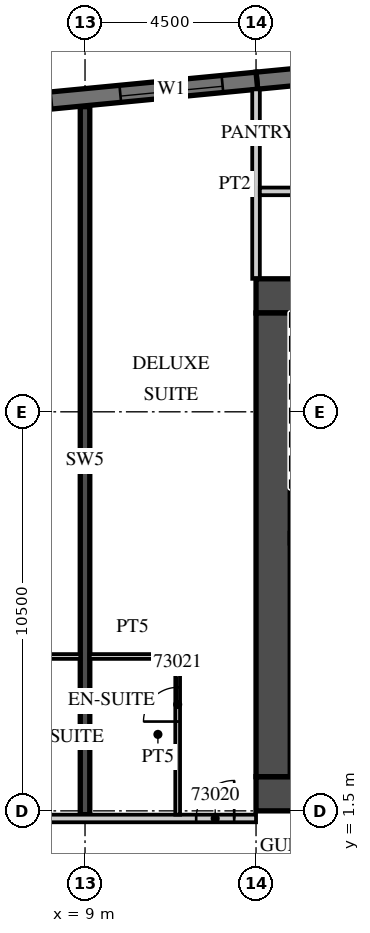
"""IFC4 building model, lengths in metres.
Left out: names, types, materials, properties, quantities, classifications, styles, units other than length and angle.
Written with IfcOpenShell. Run it as: python <this file> out.ifc"""

import sys

from ifc_helpers import new_model, si_unit, direction, frame, frame_2d, origin, place, context, subcontext, project, spatial, rectangle, extrude, element, fill, save


model = new_model("IFC4")
c1 = context("Model", 3, precision=1e-05, world=origin(), true_north=direction((0.0, 1.0)))
c2 = subcontext(c1, "Body", "Model", "MODEL_VIEW")
j1 = project(units=[si_unit("LENGTHUNIT", "METRE"), si_unit("PLANEANGLEUNIT", "RADIAN")], contexts=[c1])
p1 = place(None, origin())
s1 = spatial("IfcSite", under=j1, at=p1, CompositionType="ELEMENT")
p2 = place(p1, origin())
s2 = spatial("IfcBuilding", under=s1, at=p2, CompositionType="ELEMENT")
p3 = place(p2, frame((0.0, 0.0, 291.6)))
s3 = spatial("IfcBuildingStorey", under=s2, at=p3, CompositionType="ELEMENT", Elevation=291.6)
p4 = place(p3, frame((9.0, 1.4, 0.0), z_axis=(0.0, 0.0, 1.0), x_axis=(0.0, 1.0, 0.0)))
e1 = element("IfcWall", 1, at=p4, inside=s3, PredefinedType="SHEAR", context=c2, shape_type="SweptSolid", body=[
    extrude(rectangle(XDim=18.629, YDim=0.25, at=frame_2d((9.315, 0.0))), origin(), (0.0, 0.0, 1.0), 3.3),
])
p5 = place(p3, frame((30.946, 22.391, 0.0), z_axis=(0.0, 0.0, 1.0), x_axis=(-0.995396397117, -0.095843688398, 0.0)))
e2 = element("IfcWall", 2, at=p5, inside=s3, PredefinedType="SOLIDWALL", context=c2, shape_type="SweptSolid", body=[
    extrude(rectangle(XDim=17.505, YDim=0.45, at=frame_2d((8.752, 0.0))), origin(), (0.0, 0.0, 1.0), 3.02),
])
p6 = place(p3, frame((13.521, 20.713, 0.0), z_axis=(0.0, 0.0, 1.0), x_axis=(-0.995396277313, -0.095844932638, 0.0)))
e3 = element("IfcWall", 3, at=p6, inside=s3, PredefinedType="SOLIDWALL", context=c2, shape_type="SweptSolid", body=[
    extrude(rectangle(XDim=51.495, YDim=0.45, at=frame_2d((25.748, 0.0))), origin(), (0.0, 0.0, 1.0), 3.02),
])
p7 = place(p6, frame((0.91, 0.0, 0.45)))
e4 = element("IfcOpeningElement", 4, at=p7, cuts=e3, PredefinedType="OPENING", context=c2, shape_type="SweptSolid", body=[
    extrude(rectangle(XDim=2.7, YDim=2.25, at=frame_2d((1.35, 1.125))), frame((0.0, 0.235, 0.0), z_axis=(0.0, -1.0, 0.0), x_axis=(1.0, 0.0, 0.0)), (0.0, 0.0, 1.0), 0.47),
])
p8 = place(p6, frame((5.431, 0.0, 0.45)))
e5 = element("IfcOpeningElement", 5, at=p8, cuts=e3, PredefinedType="OPENING", context=c2, shape_type="SweptSolid", body=[
    extrude(rectangle(XDim=2.7, YDim=2.25, at=frame_2d((1.35, 1.125))), frame((0.0, 0.235, 0.0), z_axis=(0.0, -1.0, 0.0), x_axis=(1.0, 0.0, 0.0)), (0.0, 0.0, 1.0), 0.47),
])
p9 = place(p6, frame((9.952, 0.0, 0.45)))
e6 = element("IfcOpeningElement", 6, at=p9, cuts=e3, PredefinedType="OPENING", context=c2, shape_type="SweptSolid", body=[
    extrude(rectangle(XDim=2.7, YDim=2.25, at=frame_2d((1.35, 1.125))), frame((0.0, 0.235, 0.0), z_axis=(0.0, -1.0, 0.0), x_axis=(1.0, 0.0, 0.0)), (0.0, 0.0, 1.0), 0.47),
])
p10 = place(p6, frame((14.473, 0.0, 0.45)))
e7 = element("IfcOpeningElement", 7, at=p10, cuts=e3, PredefinedType="OPENING", context=c2, shape_type="SweptSolid", body=[
    extrude(rectangle(XDim=2.7, YDim=2.25, at=frame_2d((1.35, 1.125))), frame((0.0, 0.235, 0.0), z_axis=(0.0, -1.0, 0.0), x_axis=(1.0, 0.0, 0.0)), (0.0, 0.0, 1.0), 0.47),
])
p11 = place(p6, frame((18.994, 0.0, 0.45)))
e8 = element("IfcOpeningElement", 8, at=p11, cuts=e3, PredefinedType="OPENING", context=c2, shape_type="SweptSolid", body=[
    extrude(rectangle(XDim=2.7, YDim=2.25, at=frame_2d((1.35, 1.125))), frame((0.0, 0.235, 0.0), z_axis=(0.0, -1.0, 0.0), x_axis=(1.0, 0.0, 0.0)), (0.0, 0.0, 1.0), 0.47),
])
p12 = place(p6, frame((23.514, 0.0, 0.45)))
e9 = element("IfcOpeningElement", 9, at=p12, cuts=e3, PredefinedType="OPENING", context=c2, shape_type="SweptSolid", body=[
    extrude(rectangle(XDim=2.7, YDim=2.25, at=frame_2d((1.35, 1.125))), frame((0.0, 0.235, 0.0), z_axis=(0.0, -1.0, 0.0), x_axis=(1.0, 0.0, 0.0)), (0.0, 0.0, 1.0), 0.47),
])
p13 = place(p6, frame((28.035, 0.0, 0.45)))
e10 = element("IfcOpeningElement", 10, at=p13, cuts=e3, PredefinedType="OPENING", context=c2, shape_type="SweptSolid", body=[
    extrude(rectangle(XDim=2.7, YDim=2.25, at=frame_2d((1.35, 1.125))), frame((0.0, 0.235, 0.0), z_axis=(0.0, -1.0, 0.0), x_axis=(1.0, 0.0, 0.0)), (0.0, 0.0, 1.0), 0.47),
])
p14 = place(p6, frame((32.556, 0.0, 0.45)))
e11 = element("IfcOpeningElement", 11, at=p14, cuts=e3, PredefinedType="OPENING", context=c2, shape_type="SweptSolid", body=[
    extrude(rectangle(XDim=2.7, YDim=2.25, at=frame_2d((1.35, 1.125))), frame((0.0, 0.235, 0.0), z_axis=(0.0, -1.0, 0.0), x_axis=(1.0, 0.0, 0.0)), (0.0, 0.0, 1.0), 0.47),
])
p15 = place(p6, frame((37.077, 0.0, 0.45)))
e12 = element("IfcOpeningElement", 12, at=p15, cuts=e3, PredefinedType="OPENING", context=c2, shape_type="SweptSolid", body=[
    extrude(rectangle(XDim=2.7, YDim=2.25, at=frame_2d((1.35, 1.125))), frame((0.0, 0.235, 0.0), z_axis=(0.0, -1.0, 0.0), x_axis=(1.0, 0.0, 0.0)), (0.0, 0.0, 1.0), 0.47),
])
p16 = place(p6, frame((41.598, 0.0, 0.45)))
e13 = element("IfcOpeningElement", 13, at=p16, cuts=e3, PredefinedType="OPENING", context=c2, shape_type="SweptSolid", body=[
    extrude(rectangle(XDim=2.7, YDim=2.25, at=frame_2d((1.35, 1.125))), frame((0.0, 0.235, 0.0), z_axis=(0.0, -1.0, 0.0), x_axis=(1.0, 0.0, 0.0)), (0.0, 0.0, 1.0), 0.47),
])
p17 = place(p6, frame((46.118, 0.0, 0.45)))
e14 = element("IfcOpeningElement", 14, at=p17, cuts=e3, PredefinedType="OPENING", context=c2, shape_type="SweptSolid", body=[
    extrude(rectangle(XDim=2.7, YDim=2.25, at=frame_2d((1.35, 1.125))), frame((0.0, 0.235, 0.0), z_axis=(0.0, -1.0, 0.0), x_axis=(1.0, 0.0, 0.0)), (0.0, 0.0, 1.0), 0.47),
])
p18 = place(p3, frame((13.5, 15.5, 0.0), z_axis=(0.0, 0.0, 1.0), x_axis=(0.0, 1.0, 0.0)))
e15 = element("IfcWall", 15, at=p18, inside=s3, PredefinedType="PARTITIONING", context=c2, shape_type="SweptSolid", body=[
    extrude(rectangle(XDim=4.985, YDim=0.2, at=frame_2d((2.493, 0.0))), origin(), (0.0, 0.0, 1.0), 3.02),
])
p19 = place(p3, frame((-39.909, 1.3, 0.0), z_axis=(0.0, 0.0, 1.0), x_axis=(1.0, 0.0, 0.0)))
e16 = element("IfcWall", 16, at=p19, inside=s3, PredefinedType="PARTITIONING", context=c2, shape_type="SweptSolid", body=[
    extrude(rectangle(XDim=53.409, YDim=0.2, at=frame_2d((26.705, 0.0))), origin(), (0.0, 0.0, 1.0), 3.02),
])
p20 = place(p19, frame((0.255, 0.0, 0.0)))
e17 = element("IfcOpeningElement", 17, at=p20, cuts=e16, PredefinedType="OPENING", context=c2, shape_type="SweptSolid", body=[
    extrude(rectangle(XDim=0.9, YDim=2.1, at=frame_2d((0.45, 1.05))), frame((0.0, 0.11, 0.0), z_axis=(0.0, -1.0, 0.0), x_axis=(1.0, 0.0, 0.0)), (0.0, 0.0, 1.0), 0.22),
])
p21 = place(p19, frame((6.347, 0.0, 0.0)))
e18 = element("IfcOpeningElement", 18, at=p21, cuts=e16, PredefinedType="OPENING", context=c2, shape_type="SweptSolid", body=[
    extrude(rectangle(XDim=1.2, YDim=2.1, at=frame_2d((0.6, 1.05))), frame((0.0, 0.11, 0.0), z_axis=(0.0, -1.0, 0.0), x_axis=(1.0, 0.0, 0.0)), (0.0, 0.0, 1.0), 0.22),
])
p22 = place(p19, frame((13.484, 0.0, 0.0)))
e19 = element("IfcOpeningElement", 19, at=p22, cuts=e16, PredefinedType="OPENING", context=c2, shape_type="SweptSolid", body=[
    extrude(rectangle(XDim=1.0, YDim=2.1, at=frame_2d((0.5, 1.05))), frame((0.0, 0.11, 0.0), z_axis=(0.0, -1.0, 0.0), x_axis=(1.0, 0.0, 0.0)), (0.0, 0.0, 1.0), 0.22),
])
p23 = place(p19, frame((20.334, 0.0, 0.0)))
e20 = element("IfcOpeningElement", 20, at=p23, cuts=e16, PredefinedType="OPENING", context=c2, shape_type="SweptSolid", body=[
    extrude(rectangle(XDim=1.0, YDim=2.1, at=frame_2d((0.5, 1.05))), frame((0.0, 0.11, 0.0), z_axis=(0.0, -1.0, 0.0), x_axis=(1.0, 0.0, 0.0)), (0.0, 0.0, 1.0), 0.22),
])
p24 = place(p19, frame((22.484, 0.0, 0.0)))
e21 = element("IfcOpeningElement", 21, at=p24, cuts=e16, PredefinedType="OPENING", context=c2, shape_type="SweptSolid", body=[
    extrude(rectangle(XDim=1.0, YDim=2.1, at=frame_2d((0.5, 1.05))), frame((0.0, 0.11, 0.0), z_axis=(0.0, -1.0, 0.0), x_axis=(1.0, 0.0, 0.0)), (0.0, 0.0, 1.0), 0.22),
])
p25 = place(p19, frame((26.959, 0.0, 0.0)))
e22 = element("IfcOpeningElement", 22, at=p25, cuts=e16, PredefinedType="OPENING", context=c2, shape_type="SweptSolid", body=[
    extrude(rectangle(XDim=1.0, YDim=2.1, at=frame_2d((0.5, 1.05))), frame((0.0, 0.11, 0.0), z_axis=(0.0, -1.0, 0.0), x_axis=(1.0, 0.0, 0.0)), (0.0, 0.0, 1.0), 0.22),
])
p26 = place(p19, frame((36.271, 0.0, 0.0)))
e23 = element("IfcOpeningElement", 23, at=p26, cuts=e16, PredefinedType="OPENING", context=c2, shape_type="SweptSolid", body=[
    extrude(rectangle(XDim=1.2, YDim=2.1, at=frame_2d((0.6, 1.05))), frame((0.0, 0.11, 0.0), z_axis=(0.0, -1.0, 0.0), x_axis=(1.0, 0.0, 0.0)), (0.0, 0.0, 1.0), 0.22),
])
p27 = place(p19, frame((40.484, 0.0, 0.0)))
e24 = element("IfcOpeningElement", 24, at=p27, cuts=e16, PredefinedType="OPENING", context=c2, shape_type="SweptSolid", body=[
    extrude(rectangle(XDim=1.0, YDim=2.1, at=frame_2d((0.5, 1.05))), frame((0.0, 0.11, 0.0), z_axis=(0.0, -1.0, 0.0), x_axis=(1.0, 0.0, 0.0)), (0.0, 0.0, 1.0), 0.22),
])
p28 = place(p19, frame((44.959, 0.0, 0.0)))
e25 = element("IfcOpeningElement", 25, at=p28, cuts=e16, PredefinedType="OPENING", context=c2, shape_type="SweptSolid", body=[
    extrude(rectangle(XDim=1.0, YDim=2.1, at=frame_2d((0.5, 1.05))), frame((0.0, 0.11, 0.0), z_axis=(0.0, -1.0, 0.0), x_axis=(1.0, 0.0, 0.0)), (0.0, 0.0, 1.0), 0.22),
])
p29 = place(p19, frame((51.834, 0.0, 0.0)))
e26 = element("IfcOpeningElement", 26, at=p29, cuts=e16, PredefinedType="OPENING", context=c2, shape_type="SweptSolid", body=[
    extrude(rectangle(XDim=1.0, YDim=2.1, at=frame_2d((0.5, 1.05))), frame((0.0, 0.11, 0.0), z_axis=(0.0, -1.0, 0.0), x_axis=(1.0, 0.0, 0.0)), (0.0, 0.0, 1.0), 0.22),
])
p30 = place(p3, frame((6.625, 5.562, 0.0), z_axis=(0.0, 0.0, 1.0), x_axis=(1.0, 0.0, 0.0)))
e27 = element("IfcWall", 27, at=p30, inside=s3, PredefinedType="PARTITIONING", context=c2, shape_type="SweptSolid", body=[
    extrude(rectangle(XDim=2.25, YDim=0.125, at=frame_2d((1.125, 0.0))), origin(), (0.0, 0.0, 1.0), 3.02),
])
p31 = place(p3, frame((11.438, 1.4, 0.0), z_axis=(0.0, 0.0, 1.0), x_axis=(0.0, 1.0, 0.0)))
e28 = element("IfcWall", 28, at=p31, inside=s3, PredefinedType="PARTITIONING", context=c2, shape_type="SweptSolid", body=[
    extrude(rectangle(XDim=4.225, YDim=0.125, at=frame_2d((2.113, 0.0))), origin(), (0.0, 0.0, 1.0), 3.02),
])
p32 = place(p31, frame((2.45, 0.0, 0.0)))
e29 = element("IfcOpeningElement", 29, at=p32, cuts=e28, PredefinedType="OPENING", context=c2, shape_type="SweptSolid", body=[
    extrude(rectangle(XDim=0.9, YDim=2.1, at=frame_2d((0.45, 1.05))), frame((0.0, 0.073, 0.0), z_axis=(0.0, -1.0, 0.0), x_axis=(1.0, 0.0, 0.0)), (0.0, 0.0, 1.0), 0.145),
])
p33 = place(p3, frame((9.125, 5.562, 0.0), z_axis=(0.0, 0.0, 1.0), x_axis=(1.0, 0.0, 0.0)))
e30 = element("IfcWall", 30, at=p33, inside=s3, PredefinedType="PARTITIONING", context=c2, shape_type="SweptSolid", body=[
    extrude(rectangle(XDim=2.25, YDim=0.125, at=frame_2d((1.125, 0.0))), origin(), (0.0, 0.0, 1.0), 3.02),
])
p34 = place(p3, frame((13.5, 1.95, 0.0), z_axis=(0.0, 0.0, 1.0), x_axis=(1.0, 0.0, 0.0)))
e31 = element("IfcWall", 31, at=p34, inside=s3, PredefinedType="SHEAR", context=c2, shape_type="SweptSolid", body=[
    extrude(rectangle(XDim=18.0, YDim=0.9, at=frame_2d((9.0, 0.0))), origin(), (0.0, 0.0, 1.0), 3.02),
])
p35 = place(p34, frame((1.475, 0.0, 0.0)))
e32 = element("IfcOpeningElement", 32, at=p35, cuts=e31, PredefinedType="OPENING", context=c2, shape_type="SweptSolid", body=[
    extrude(rectangle(XDim=1.8, YDim=2.1, at=frame_2d((0.9, 1.05))), frame((0.0, 0.46, 0.0), z_axis=(0.0, -1.0, 0.0), x_axis=(1.0, 0.0, 0.0)), (0.0, 0.0, 1.0), 0.92),
])
p36 = place(p3, frame((13.5, 15.05, 0.0), z_axis=(0.0, 0.0, 1.0), x_axis=(1.0, 0.0, 0.0)))
e33 = element("IfcWall", 33, at=p36, inside=s3, PredefinedType="SHEAR", context=c2, shape_type="SweptSolid", body=[
    extrude(rectangle(XDim=6.8, YDim=0.9, at=frame_2d((3.4, 0.0))), origin(), (0.0, 0.0, 1.0), 3.02),
])
p37 = place(p36, frame((4.725, 0.0, 0.0)))
e34 = element("IfcOpeningElement", 34, at=p37, cuts=e33, PredefinedType="OPENING", context=c2, shape_type="SweptSolid", body=[
    extrude(rectangle(XDim=1.2, YDim=2.1, at=frame_2d((0.6, 1.05))), frame((0.0, 0.46, 0.0), z_axis=(0.0, -1.0, 0.0), x_axis=(1.0, 0.0, 0.0)), (0.0, 0.0, 1.0), 0.92),
])
p38 = place(p3, frame((13.95, 2.4, 0.0), z_axis=(0.0, 0.0, 1.0), x_axis=(0.0, 1.0, 0.0)))
e35 = element("IfcWall", 35, at=p38, inside=s3, PredefinedType="SHEAR", context=c2, shape_type="SweptSolid", body=[
    extrude(rectangle(XDim=12.2, YDim=0.9, at=frame_2d((6.1, 0.0))), origin(), (0.0, 0.0, 1.0), 3.02),
])
p39 = place(p3, frame((13.6, 17.8, 0.0), z_axis=(0.0, 0.0, 1.0), x_axis=(1.0, 0.0, 0.0)))
e36 = element("IfcWall", 36, at=p39, inside=s3, PredefinedType="PARTITIONING", context=c2, shape_type="SweptSolid", body=[
    extrude(rectangle(XDim=21.354, YDim=0.2, at=frame_2d((10.677, 0.0))), origin(), (0.0, 0.0, 1.0), 3.02),
])
p40 = place(p39, frame((15.012, 0.0, 0.0)))
e37 = element("IfcOpeningElement", 37, at=p40, cuts=e36, PredefinedType="OPENING", context=c2, shape_type="SweptSolid", body=[
    extrude(rectangle(XDim=0.9, YDim=2.1, at=frame_2d((0.45, 1.05))), frame((0.0, 0.11, 0.0), z_axis=(0.0, -1.0, 0.0), x_axis=(1.0, 0.0, 0.0)), (0.0, 0.0, 1.0), 0.22),
])
p41 = place(p39, frame((6.712, 0.0, 0.0)))
e38 = element("IfcOpeningElement", 38, at=p41, cuts=e36, PredefinedType="OPENING", context=c2, shape_type="SweptSolid", body=[
    extrude(rectangle(XDim=0.9, YDim=2.1, at=frame_2d((0.45, 1.05))), frame((0.0, 0.11, 0.0), z_axis=(0.0, -1.0, 0.0), x_axis=(1.0, 0.0, 0.0)), (0.0, 0.0, 1.0), 0.22),
])
p42 = place(p7, origin())
e39 = element("IfcWindow", 39, at=p42, inside=s3, PartitioningType="SINGLE_PANEL", PredefinedType="WINDOW", context=c2, shape_type="SweptSolid", body=[
    extrude(rectangle(XDim=2.7, YDim=2.25, at=frame_2d((1.35, 1.125))), frame((0.0, 0.09, 0.0), z_axis=(0.0, -1.0, 0.0), x_axis=(1.0, 0.0, 0.0)), (0.0, 0.0, 1.0), 0.06),
])
fill(e4, e39)
p43 = place(p29, origin())
e40 = element("IfcDoor", 40, at=p43, inside=s3, OperationType="SINGLE_SWING_RIGHT", PredefinedType="DOOR", context=c2, shape_type="SweptSolid", body=[
    extrude(rectangle(XDim=1.0, YDim=2.1, at=frame_2d((0.5, 1.05))), frame((0.0, 0.025, 0.0), z_axis=(0.0, -1.0, 0.0), x_axis=(1.0, 0.0, 0.0)), (0.0, 0.0, 1.0), 0.05),
])
fill(e26, e40)
p44 = place(p32, origin())
e41 = element("IfcDoor", 41, at=p44, inside=s3, OperationType="SINGLE_SWING_LEFT", PredefinedType="DOOR", context=c2, shape_type="SweptSolid", body=[
    extrude(rectangle(XDim=0.9, YDim=2.1, at=frame_2d((0.45, 1.05))), frame((0.0, 0.025, 0.0), z_axis=(0.0, -1.0, 0.0), x_axis=(1.0, 0.0, 0.0)), (0.0, 0.0, 1.0), 0.05),
])
fill(e29, e41)
save(model, sys.argv[1])
